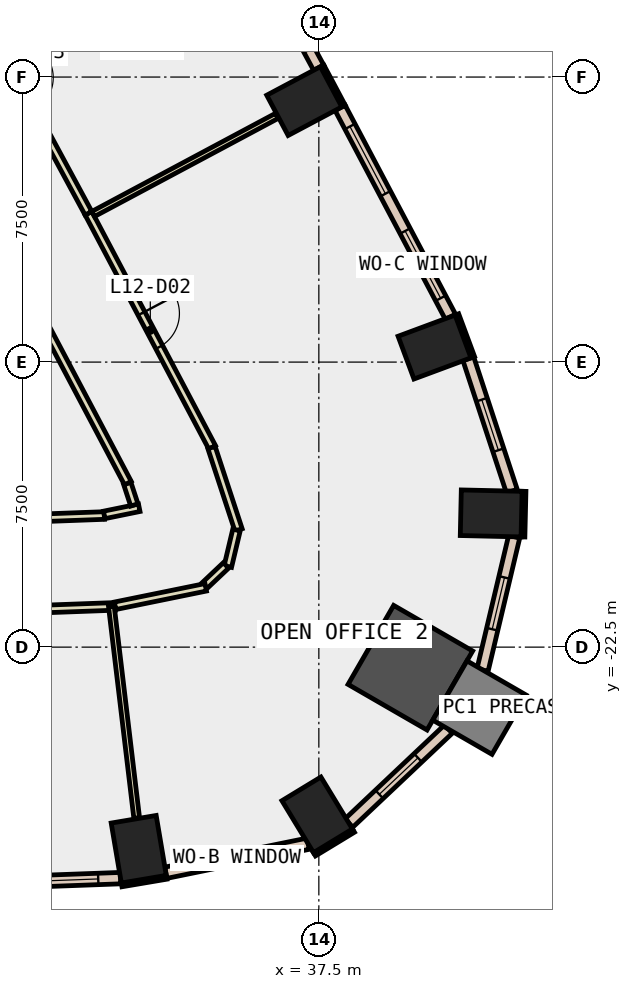
"""IFC4 building model, lengths in metres.
Left out: names, types, materials, properties, quantities, classifications, styles, units other than length and angle.
Written with IfcOpenShell. Run it as: python <this file> out.ifc"""

import sys

from ifc_helpers import new_model, si_unit, direction, frame, frame_2d, origin, origin_2d, place, context, subcontext, project, spatial, rectangle, extrude, element, fill, save


model = new_model("IFC4")
c1 = context("Model", 3, precision=1e-05, world=origin(), true_north=direction((0.0, 1.0)))
c2 = subcontext(c1, "Body", "Model", "MODEL_VIEW")
j1 = project(units=[si_unit("LENGTHUNIT", "METRE"), si_unit("PLANEANGLEUNIT", "RADIAN")], contexts=[c1])
p1 = place(None, origin())
s1 = spatial("IfcSite", under=j1, at=p1, CompositionType="ELEMENT")
p2 = place(p1, origin())
s2 = spatial("IfcBuilding", under=s1, at=p2, CompositionType="ELEMENT")
p3 = place(p2, frame((0.0, 0.0, 60.2)))
s3 = spatial("IfcBuildingStorey", under=s2, at=p3, CompositionType="ELEMENT", Elevation=60.2)
for number, where, z_axis, x_axis in (
    (1, (32.761, -27.818, -0.4), (0.0, 0.0, 1.0), (0.986, 0.167, 0.0)),
    (2, (37.457, -26.913, -0.4), (0.0, 0.0, 1.0), (0.855, 0.519, 0.0)),
):
    element("IfcColumn", number, at=place(p3, frame(where, z_axis=z_axis, x_axis=x_axis)), inside=s3, PredefinedType="COLUMN", context=c2, shape_type="SweptSolid", body=[
        extrude(rectangle(XDim=1.2, YDim=1.6, at=origin_2d()), origin(), (0.0, 0.0, 1.0), 4.2),
    ])
p4 = place(p3, frame((39.908, -23.041, -0.4), z_axis=(0.0, 0.0, 1.0), x_axis=(-0.866025403784, 0.5, 0.0)))
e3 = element("IfcColumn", 3, at=p4, inside=s3, PredefinedType="COLUMN", context=c2, shape_type="SweptSolid", body=[
    extrude(rectangle(XDim=2.4, YDim=2.4, at=origin_2d()), origin(), (0.0, 0.0, 1.0), 4.2),
])
for number, where, z_axis, x_axis in (
    (4, (42.035, -18.982, -0.4), (0.0, 0.0, 1.0), (0.023, 1.0, 0.0)),
    (5, (40.544, -14.604, -0.4), (0.0, 0.0, 1.0), (-0.348, 0.937, 0.0)),
    (6, (37.117, -8.132, -0.4), (0.0, 0.0, 1.0), (-0.469, 0.883, 0.0)),
):
    element("IfcColumn", number, at=place(p3, frame(where, z_axis=z_axis, x_axis=x_axis)), inside=s3, PredefinedType="COLUMN", context=c2, shape_type="SweptSolid", body=[
        extrude(rectangle(XDim=1.2, YDim=1.6, at=origin_2d()), origin(), (0.0, 0.0, 1.0), 4.2),
    ])
p5 = place(p3, frame((41.727, -24.091, -0.4), z_axis=(0.0, 0.0, 1.0), x_axis=(-0.866025403784, 0.5, 0.0)))
e7 = element("IfcColumn", 7, at=p5, inside=s3, PredefinedType="COLUMN", context=c2, shape_type="SweptSolid", body=[
    extrude(rectangle(XDim=1.8, YDim=1.8, at=origin_2d()), origin(), (0.0, 0.0, 1.0), 4.2),
])
p6 = place(p3, frame((41.55, -14.871, 0.0), z_axis=(0.0, 0.0, 1.0), x_axis=(-0.348268249601, 0.937394914814, 0.0)))
e8 = element("IfcWall", 8, at=p6, inside=s3, PredefinedType="STANDARD", context=c2, shape_type="SweptSolid", body=[
    extrude(rectangle(XDim=1.2, YDim=0.1, at=frame_2d((0.6, 0.0))), origin(), (0.0, 0.0, 1.0), 3.8),
])
p7 = place(p3, frame((38.149, -8.263, 0.0), z_axis=(0.0, 0.0, 1.0), x_axis=(-0.469467784567, 0.882949601763, 0.0)))
e9 = element("IfcWall", 9, at=p7, inside=s3, PredefinedType="STANDARD", context=c2, shape_type="SweptSolid", body=[
    extrude(rectangle(XDim=1.199, YDim=0.1, at=frame_2d((0.6, 0.0))), origin(), (0.0, 0.0, 1.0), 3.8),
])
p8 = place(p3, frame((32.311, -28.756, 0.0), z_axis=(0.0, 0.0, 1.0), x_axis=(0.98597830993, 0.166873522011, 0.0)))
e10 = element("IfcWall", 10, at=p8, inside=s3, PredefinedType="STANDARD", context=c2, shape_type="SweptSolid", body=[
    extrude(rectangle(XDim=1.2, YDim=0.1, at=frame_2d((0.6, 0.0))), origin(), (0.0, 0.0, 1.0), 3.8),
])
p9 = place(p3, frame((37.385, -27.951, 0.0), z_axis=(0.0, 0.0, 1.0), x_axis=(0.854716608594, 0.519094903649, 0.0)))
e11 = element("IfcWall", 11, at=p9, inside=s3, PredefinedType="STANDARD", context=c2, shape_type="SweptSolid", body=[
    extrude(rectangle(XDim=1.2, YDim=0.1, at=frame_2d((0.6, 0.0))), origin(), (0.0, 0.0, 1.0), 3.8),
])
p10 = place(p3, frame((42.871, -19.601, 0.0), z_axis=(0.0, 0.0, 1.0), x_axis=(0.023183352363, 0.999731229968, 0.0)))
e12 = element("IfcWall", 12, at=p10, inside=s3, PredefinedType="STANDARD", context=c2, shape_type="SweptSolid", body=[
    extrude(rectangle(XDim=1.2, YDim=0.1, at=frame_2d((0.6, 0.0))), origin(), (0.0, 0.0, 1.0), 3.8),
])
p11 = place(p3, frame((25.134, -28.841, 0.0), z_axis=(0.0, 0.0, 1.0), x_axis=(0.999322852286, 0.036794522671, 0.0)))
e13 = element("IfcWall", 13, at=p11, inside=s3, PredefinedType="STANDARD", context=c2, shape_type="SweptSolid", body=[
    extrude(rectangle(XDim=7.153, YDim=0.3, at=frame_2d((3.576, 0.0))), origin(), (0.0, 0.0, 1.0), 3.8),
])
p12 = place(p11, frame((0.588, 0.0, 0.9)))
e14 = element("IfcOpeningElement", 14, at=p12, cuts=e13, PredefinedType="OPENING", context=c2, shape_type="SweptSolid", body=[
    extrude(rectangle(XDim=2.4, YDim=2.6, at=frame_2d((1.2, 1.3))), frame((0.0, 0.16, 0.0), z_axis=(0.0, -1.0, 0.0), x_axis=(1.0, 0.0, 0.0)), (0.0, 0.0, 1.0), 0.32),
])
p13 = place(p11, frame((4.165, 0.0, 0.9)))
e15 = element("IfcOpeningElement", 15, at=p13, cuts=e13, PredefinedType="OPENING", context=c2, shape_type="SweptSolid", body=[
    extrude(rectangle(XDim=2.4, YDim=2.6, at=frame_2d((1.2, 1.3))), frame((0.0, 0.16, 0.0), z_axis=(0.0, -1.0, 0.0), x_axis=(1.0, 0.0, 0.0)), (0.0, 0.0, 1.0), 0.32),
])
p14 = place(p3, frame((33.473, -28.437, 0.0), z_axis=(0.0, 0.0, 1.0), x_axis=(0.979824229846, 0.199861148317, 0.0)))
e16 = element("IfcWall", 16, at=p14, inside=s3, PredefinedType="STANDARD", context=c2, shape_type="SweptSolid", body=[
    extrude(rectangle(XDim=3.822, YDim=0.3, at=frame_2d((1.911, 0.0))), origin(), (0.0, 0.0, 1.0), 3.8),
])
p15 = place(p14, frame((1.211, 0.0, 0.9)))
e17 = element("IfcOpeningElement", 17, at=p15, cuts=e16, PredefinedType="OPENING", context=c2, shape_type="SweptSolid", body=[
    extrude(rectangle(XDim=1.4, YDim=2.6, at=frame_2d((0.7, 1.3))), frame((0.0, 0.16, 0.0), z_axis=(0.0, -1.0, 0.0), x_axis=(1.0, 0.0, 0.0)), (0.0, 0.0, 1.0), 0.32),
])
p16 = place(p3, frame((38.29, -27.13, 0.0), z_axis=(0.0, 0.0, 1.0), x_axis=(0.727082698591, 0.686549888508, 0.0)))
e18 = element("IfcWall", 18, at=p16, inside=s3, PredefinedType="STANDARD", context=c2, shape_type="SweptSolid", body=[
    extrude(rectangle(XDim=3.602, YDim=0.3, at=frame_2d((1.801, 0.0))), origin(), (0.0, 0.0, 1.0), 3.8),
])
p17 = place(p16, frame((1.101, 0.0, 0.9)))
e19 = element("IfcOpeningElement", 19, at=p17, cuts=e18, PredefinedType="OPENING", context=c2, shape_type="SweptSolid", body=[
    extrude(rectangle(XDim=1.4, YDim=2.6, at=frame_2d((0.7, 1.3))), frame((0.0, 0.16, 0.0), z_axis=(0.0, -1.0, 0.0), x_axis=(1.0, 0.0, 0.0)), (0.0, 0.0, 1.0), 0.32),
])
p18 = place(p3, frame((41.808, -23.1, 0.0), z_axis=(0.0, 0.0, 1.0), x_axis=(0.230893603767, 0.972979004778, 0.0)))
e20 = element("IfcWall", 20, at=p18, inside=s3, PredefinedType="STANDARD", context=c2, shape_type="SweptSolid", body=[
    extrude(rectangle(XDim=3.603, YDim=0.3, at=frame_2d((1.801, 0.0))), origin(), (0.0, 0.0, 1.0), 3.8),
])
p19 = place(p18, frame((1.101, 0.0, 0.9)))
e21 = element("IfcOpeningElement", 21, at=p19, cuts=e20, PredefinedType="OPENING", context=c2, shape_type="SweptSolid", body=[
    extrude(rectangle(XDim=1.4, YDim=2.6, at=frame_2d((0.7, 1.3))), frame((0.0, 0.16, 0.0), z_axis=(0.0, -1.0, 0.0), x_axis=(1.0, 0.0, 0.0)), (0.0, 0.0, 1.0), 0.32),
])
p20 = place(p3, frame((42.578, -18.395, 0.0), z_axis=(0.0, 0.0, 1.0), x_axis=(-0.31208801137, 0.95005319491, 0.0)))
e22 = element("IfcWall", 22, at=p20, inside=s3, PredefinedType="STANDARD", context=c2, shape_type="SweptSolid", body=[
    extrude(rectangle(XDim=3.665, YDim=0.3, at=frame_2d((1.833, 0.0))), origin(), (0.0, 0.0, 1.0), 3.8),
])
p21 = place(p20, frame((1.133, 0.0, 0.9)))
e23 = element("IfcOpeningElement", 23, at=p21, cuts=e22, PredefinedType="OPENING", context=c2, shape_type="SweptSolid", body=[
    extrude(rectangle(XDim=1.4, YDim=2.6, at=frame_2d((0.7, 1.3))), frame((0.0, 0.16, 0.0), z_axis=(0.0, -1.0, 0.0), x_axis=(1.0, 0.0, 0.0)), (0.0, 0.0, 1.0), 0.32),
])
p22 = place(p3, frame((40.964, -13.81, 0.0), z_axis=(0.0, 0.0, 1.0), x_axis=(-0.467041710902, 0.884235285587, 0.0)))
e24 = element("IfcWall", 24, at=p22, inside=s3, PredefinedType="STANDARD", context=c2, shape_type="SweptSolid", body=[
    extrude(rectangle(XDim=6.22, YDim=0.3, at=frame_2d((3.11, 0.0))), origin(), (0.0, 0.0, 1.0), 3.8),
])
p23 = place(p22, frame((0.555, 0.0, 0.9)))
e25 = element("IfcOpeningElement", 25, at=p23, cuts=e24, PredefinedType="OPENING", context=c2, shape_type="SweptSolid", body=[
    extrude(rectangle(XDim=2.0, YDim=2.6, at=frame_2d((1.0, 1.3))), frame((0.0, 0.16, 0.0), z_axis=(0.0, -1.0, 0.0), x_axis=(1.0, 0.0, 0.0)), (0.0, 0.0, 1.0), 0.32),
])
p24 = place(p22, frame((3.665, 0.0, 0.9)))
e26 = element("IfcOpeningElement", 26, at=p24, cuts=e24, PredefinedType="OPENING", context=c2, shape_type="SweptSolid", body=[
    extrude(rectangle(XDim=2.0, YDim=2.6, at=frame_2d((1.0, 1.3))), frame((0.0, 0.16, 0.0), z_axis=(0.0, -1.0, 0.0), x_axis=(1.0, 0.0, 0.0)), (0.0, 0.0, 1.0), 0.32),
])
p25 = place(p3, frame((37.495, -7.253, 0.0), z_axis=(0.0, 0.0, 1.0), x_axis=(-0.475413659872, 0.879762383833, 0.0)))
e27 = element("IfcWall", 27, at=p25, inside=s3, PredefinedType="STANDARD", context=c2, shape_type="SweptSolid", body=[
    extrude(rectangle(XDim=6.125, YDim=0.3, at=frame_2d((3.063, 0.0))), origin(), (0.0, 0.0, 1.0), 3.8),
])
p26 = place(p25, frame((0.531, 0.0, 0.9)))
e28 = element("IfcOpeningElement", 28, at=p26, cuts=e27, PredefinedType="OPENING", context=c2, shape_type="SweptSolid", body=[
    extrude(rectangle(XDim=2.0, YDim=2.6, at=frame_2d((1.0, 1.3))), frame((0.0, 0.16, 0.0), z_axis=(0.0, -1.0, 0.0), x_axis=(1.0, 0.0, 0.0)), (0.0, 0.0, 1.0), 0.32),
])
p27 = place(p25, frame((3.594, 0.0, 0.9)))
e29 = element("IfcOpeningElement", 29, at=p27, cuts=e27, PredefinedType="OPENING", context=c2, shape_type="SweptSolid", body=[
    extrude(rectangle(XDim=2.0, YDim=2.6, at=frame_2d((1.0, 1.3))), frame((0.0, 0.16, 0.0), z_axis=(0.0, -1.0, 0.0), x_axis=(1.0, 0.0, 0.0)), (0.0, 0.0, 1.0), 0.32),
])
p28 = place(p3, frame((24.235, -19.318, 0.0), z_axis=(0.0, 0.0, 1.0), x_axis=(0.999320698485, 0.036852972476, 0.0)))
e30 = element("IfcWall", 30, at=p28, inside=s3, PredefinedType="PARTITIONING", context=c2, shape_type="SweptSolid", body=[
    extrude(rectangle(XDim=7.625, YDim=0.2, at=frame_2d((3.812, 0.0))), origin(), (0.0, 0.0, 1.0), 3.8),
])
p29 = place(p3, frame((31.853, -19.021, 0.0), z_axis=(0.0, 0.0, 1.0), x_axis=(0.979793671436, 0.200010903236, 0.0)))
e31 = element("IfcWall", 31, at=p29, inside=s3, PredefinedType="PARTITIONING", context=c2, shape_type="SweptSolid", body=[
    extrude(rectangle(XDim=0.94, YDim=0.2, at=frame_2d((0.47, 0.0))), origin(), (0.0, 0.0, 1.0), 3.8),
])
p30 = place(p3, frame((32.645, -18.758, 0.0), z_axis=(0.0, 0.0, 1.0), x_axis=(-0.311683867653, 0.950185859001, 0.0)))
e32 = element("IfcWall", 32, at=p30, inside=s3, PredefinedType="PARTITIONING", context=c2, shape_type="SweptSolid", body=[
    extrude(rectangle(XDim=0.597, YDim=0.2, at=frame_2d((0.298, 0.0))), origin(), (0.0, 0.0, 1.0), 3.8),
])
p31 = place(p3, frame((32.475, -18.185, 0.0), z_axis=(0.0, 0.0, 1.0), x_axis=(-0.467123190417, 0.884192244353, 0.0)))
e33 = element("IfcWall", 33, at=p31, inside=s3, PredefinedType="PARTITIONING", context=c2, shape_type="SweptSolid", body=[
    extrude(rectangle(XDim=6.677, YDim=0.2, at=frame_2d((3.339, 0.0))), origin(), (0.0, 0.0, 1.0), 3.8),
])
p32 = place(p3, frame((32.141, -21.428, 0.0), z_axis=(0.0, 0.0, 1.0), x_axis=(-0.999324021202, -0.036762761723, 0.0)))
e34 = element("IfcWall", 34, at=p32, inside=s3, PredefinedType="PARTITIONING", context=c2, shape_type="SweptSolid", body=[
    extrude(rectangle(XDim=7.836, YDim=0.2, at=frame_2d((3.918, 0.0))), origin(), (0.0, 0.0, 1.0), 3.8),
])
p33 = place(p3, frame((31.438, -11.083, 0.0), z_axis=(0.0, 0.0, 1.0), x_axis=(0.467077609314, -0.884216323575, 0.0)))
e35 = element("IfcWall", 35, at=p33, inside=s3, PredefinedType="PARTITIONING", context=c2, shape_type="SweptSolid", body=[
    extrude(rectangle(XDim=6.967, YDim=0.2, at=frame_2d((3.483, 0.0))), origin(), (0.0, 0.0, 1.0), 3.8),
])
p34 = place(p33, frame((2.983, 0.0, 0.0)))
e36 = element("IfcOpeningElement", 36, at=p34, cuts=e35, PredefinedType="OPENING", context=c2, shape_type="SweptSolid", body=[
    extrude(rectangle(XDim=1.0, YDim=2.1, at=frame_2d((0.5, 1.05))), frame((0.0, 0.11, 0.0), z_axis=(0.0, -1.0, 0.0), x_axis=(1.0, 0.0, 0.0)), (0.0, 0.0, 1.0), 0.22),
])
p35 = place(p3, frame((34.676, -17.25, 0.0), z_axis=(0.0, 0.0, 1.0), x_axis=(0.311855014756, -0.950129701552, 0.0)))
e37 = element("IfcWall", 37, at=p35, inside=s3, PredefinedType="PARTITIONING", context=c2, shape_type="SweptSolid", body=[
    extrude(rectangle(XDim=2.28, YDim=0.2, at=frame_2d((1.14, 0.0))), origin(), (0.0, 0.0, 1.0), 3.8),
])
p36 = place(p3, frame((35.333, -19.419, 0.0), z_axis=(0.0, 0.0, 1.0), x_axis=(-0.231107564644, -0.97292820576, 0.0)))
e38 = element("IfcWall", 38, at=p36, inside=s3, PredefinedType="PARTITIONING", context=c2, shape_type="SweptSolid", body=[
    extrude(rectangle(XDim=0.987, YDim=0.2, at=frame_2d((0.493, 0.0))), origin(), (0.0, 0.0, 1.0), 3.8),
])
p37 = place(p3, frame((35.056, -20.35, 0.0), z_axis=(0.0, 0.0, 1.0), x_axis=(-0.72702197617, -0.686614190186, 0.0)))
e39 = element("IfcWall", 39, at=p37, inside=s3, PredefinedType="PARTITIONING", context=c2, shape_type="SweptSolid", body=[
    extrude(rectangle(XDim=0.767, YDim=0.2, at=frame_2d((0.384, 0.0))), origin(), (0.0, 0.0, 1.0), 3.8),
])
p38 = place(p3, frame((34.523, -20.926, 0.0), z_axis=(0.0, 0.0, 1.0), x_axis=(-0.979840552367, -0.199781110063, 0.0)))
e40 = element("IfcWall", 40, at=p38, inside=s3, PredefinedType="PARTITIONING", context=c2, shape_type="SweptSolid", body=[
    extrude(rectangle(XDim=2.433, YDim=0.2, at=frame_2d((1.217, 0.0))), origin(), (0.0, 0.0, 1.0), 3.8),
])
p39 = place(p3, frame((27.988, -4.699, 0.0), z_axis=(0.0, 0.0, 1.0), x_axis=(0.475319272717, -0.879813383044, 0.0)))
e41 = element("IfcWall", 41, at=p39, inside=s3, PredefinedType="PARTITIONING", context=c2, shape_type="SweptSolid", body=[
    extrude(rectangle(XDim=7.256, YDim=0.2, at=frame_2d((3.628, 0.0))), origin(), (0.0, 0.0, 1.0), 3.8),
])
p40 = place(p39, frame((3.203, 0.0, 0.0)))
e42 = element("IfcOpeningElement", 42, at=p40, cuts=e41, PredefinedType="OPENING", context=c2, shape_type="SweptSolid", body=[
    extrude(rectangle(XDim=1.0, YDim=2.1, at=frame_2d((0.5, 1.05))), frame((0.0, 0.11, 0.0), z_axis=(0.0, -1.0, 0.0), x_axis=(1.0, 0.0, 0.0)), (0.0, 0.0, 1.0), 0.22),
])
p41 = place(p3, frame((32.041, -21.432, 0.0), z_axis=(0.0, 0.0, 1.0), x_axis=(0.118848018273, -0.992912457648, 0.0)))
e43 = element("IfcWall", 43, at=p41, inside=s3, PredefinedType="PARTITIONING", context=c2, shape_type="SweptSolid", body=[
    extrude(rectangle(XDim=5.604, YDim=0.15, at=frame_2d((2.802, 0.0))), origin(), (0.0, 0.0, 1.0), 3.8),
])
p42 = place(p3, frame((31.561, -11.103, 0.0), z_axis=(0.0, 0.0, 1.0), x_axis=(0.882056805494, 0.47114306944, 0.0)))
e44 = element("IfcWall", 44, at=p42, inside=s3, PredefinedType="PARTITIONING", context=c2, shape_type="SweptSolid", body=[
    extrude(rectangle(XDim=5.48, YDim=0.15, at=frame_2d((2.74, 0.0))), origin(), (0.0, 0.0, 1.0), 3.8),
])
p43 = place(p13, origin())
e45 = element("IfcWindow", 45, at=p43, inside=s3, PartitioningType="SINGLE_PANEL", PredefinedType="WINDOW", context=c2, shape_type="SweptSolid", body=[
    extrude(rectangle(XDim=2.4, YDim=2.6, at=frame_2d((1.2, 1.3))), frame((0.0, 0.03, 0.0), z_axis=(0.0, -1.0, 0.0), x_axis=(1.0, 0.0, 0.0)), (0.0, 0.0, 1.0), 0.06),
])
fill(e15, e45)
p44 = place(p15, origin())
e46 = element("IfcWindow", 46, at=p44, inside=s3, PartitioningType="SINGLE_PANEL", PredefinedType="WINDOW", context=c2, shape_type="SweptSolid", body=[
    extrude(rectangle(XDim=1.4, YDim=2.6, at=frame_2d((0.7, 1.3))), frame((0.0, 0.03, 0.0), z_axis=(0.0, -1.0, 0.0), x_axis=(1.0, 0.0, 0.0)), (0.0, 0.0, 1.0), 0.06),
])
fill(e17, e46)
p45 = place(p17, origin())
e47 = element("IfcWindow", 47, at=p45, inside=s3, PartitioningType="SINGLE_PANEL", PredefinedType="WINDOW", context=c2, shape_type="SweptSolid", body=[
    extrude(rectangle(XDim=1.4, YDim=2.6, at=frame_2d((0.7, 1.3))), frame((0.0, 0.03, 0.0), z_axis=(0.0, -1.0, 0.0), x_axis=(1.0, 0.0, 0.0)), (0.0, 0.0, 1.0), 0.06),
])
fill(e19, e47)
p46 = place(p19, origin())
e48 = element("IfcWindow", 48, at=p46, inside=s3, PartitioningType="SINGLE_PANEL", PredefinedType="WINDOW", context=c2, shape_type="SweptSolid", body=[
    extrude(rectangle(XDim=1.4, YDim=2.6, at=frame_2d((0.7, 1.3))), frame((0.0, 0.03, 0.0), z_axis=(0.0, -1.0, 0.0), x_axis=(1.0, 0.0, 0.0)), (0.0, 0.0, 1.0), 0.06),
])
fill(e21, e48)
p47 = place(p21, origin())
e49 = element("IfcWindow", 49, at=p47, inside=s3, PartitioningType="SINGLE_PANEL", PredefinedType="WINDOW", context=c2, shape_type="SweptSolid", body=[
    extrude(rectangle(XDim=1.4, YDim=2.6, at=frame_2d((0.7, 1.3))), frame((0.0, 0.03, 0.0), z_axis=(0.0, -1.0, 0.0), x_axis=(1.0, 0.0, 0.0)), (0.0, 0.0, 1.0), 0.06),
])
fill(e23, e49)
p48 = place(p23, origin())
e50 = element("IfcWindow", 50, at=p48, inside=s3, PartitioningType="SINGLE_PANEL", PredefinedType="WINDOW", context=c2, shape_type="SweptSolid", body=[
    extrude(rectangle(XDim=2.0, YDim=2.6, at=frame_2d((1.0, 1.3))), frame((0.0, 0.03, 0.0), z_axis=(0.0, -1.0, 0.0), x_axis=(1.0, 0.0, 0.0)), (0.0, 0.0, 1.0), 0.06),
])
fill(e25, e50)
p49 = place(p24, origin())
e51 = element("IfcWindow", 51, at=p49, inside=s3, PartitioningType="SINGLE_PANEL", PredefinedType="WINDOW", context=c2, shape_type="SweptSolid", body=[
    extrude(rectangle(XDim=2.0, YDim=2.6, at=frame_2d((1.0, 1.3))), frame((0.0, 0.03, 0.0), z_axis=(0.0, -1.0, 0.0), x_axis=(1.0, 0.0, 0.0)), (0.0, 0.0, 1.0), 0.06),
])
fill(e26, e51)
p50 = place(p34, origin())
e52 = element("IfcDoor", 52, at=p50, inside=s3, OperationType="SINGLE_SWING_LEFT", PredefinedType="DOOR", context=c2, shape_type="SweptSolid", body=[
    extrude(rectangle(XDim=1.0, YDim=2.1, at=frame_2d((0.5, 1.05))), frame((0.0, 0.025, 0.0), z_axis=(0.0, -1.0, 0.0), x_axis=(1.0, 0.0, 0.0)), (0.0, 0.0, 1.0), 0.05),
])
fill(e36, e52)
save(model, sys.argv[1])
